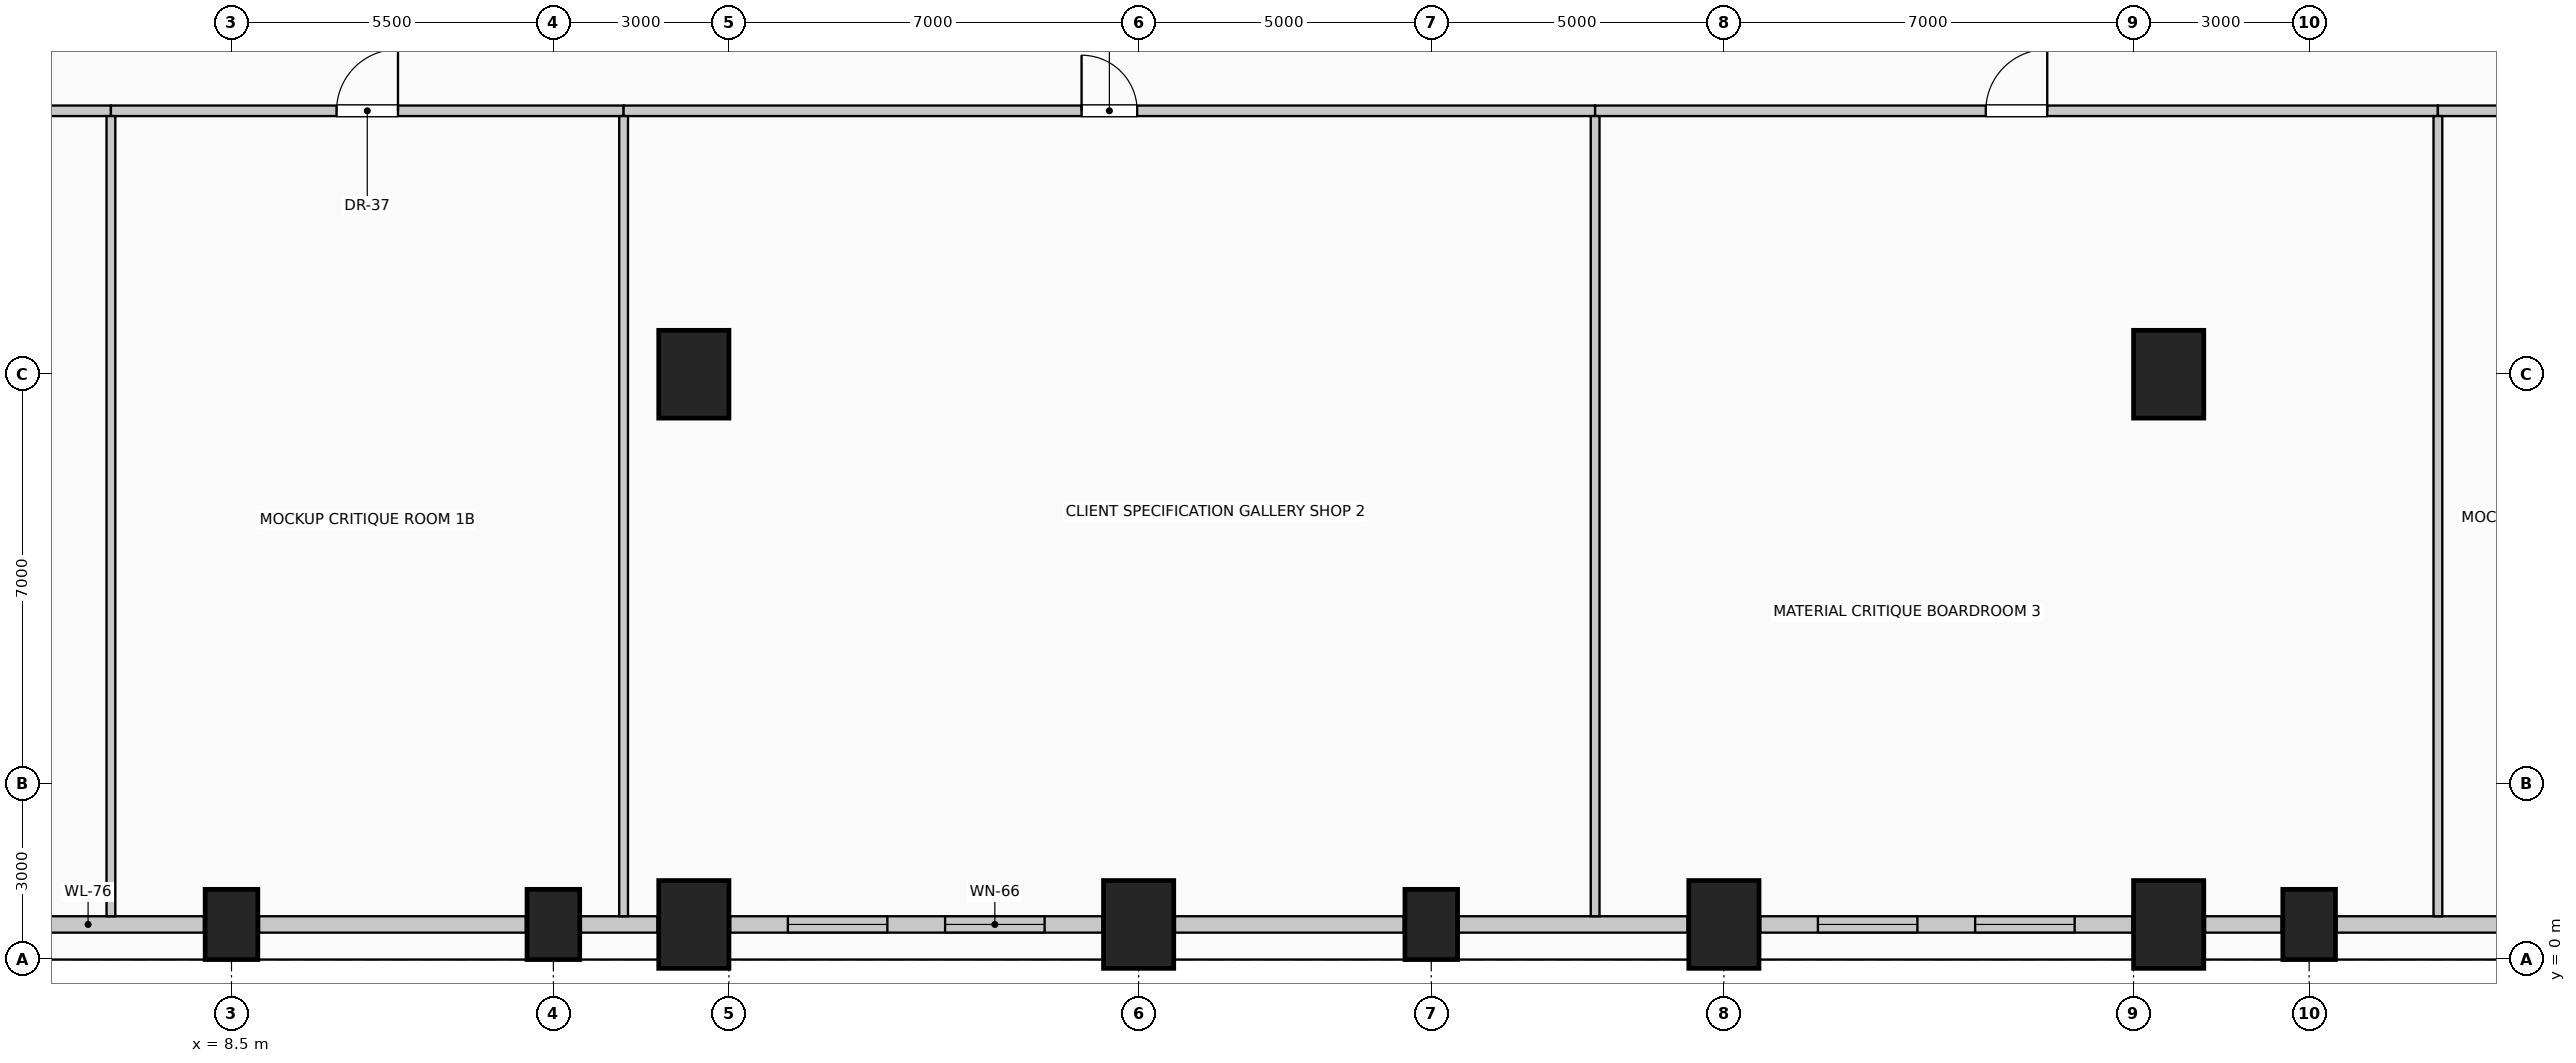
"""IFC4 building model, lengths in metres.
Left out: names, types, materials, properties, quantities, classifications, styles, units other than length and angle.
Written with IfcOpenShell. Run it as: python <this file> out.ifc"""

import sys

from ifc_helpers import new_model, si_unit, direction, frame, frame_2d, origin, origin_2d, place, context, subcontext, project, spatial, rectangle, extrude, element, fill, save


model = new_model("IFC4")
c1 = context("Model", 3, precision=1e-05, world=origin(), true_north=direction((0.0, 1.0)))
c2 = subcontext(c1, "Body", "Model", "MODEL_VIEW")
j1 = project(units=[si_unit("LENGTHUNIT", "METRE"), si_unit("PLANEANGLEUNIT", "RADIAN")], contexts=[c1])
p1 = place(None, origin())
s1 = spatial("IfcSite", under=j1, at=p1, CompositionType="ELEMENT")
p2 = place(p1, origin())
s2 = spatial("IfcBuilding", under=s1, at=p2, CompositionType="ELEMENT")
p3 = place(p2, frame((0.0, 0.0, 62.6)))
s3 = spatial("IfcBuildingStorey", under=s2, at=p3, CompositionType="ELEMENT", Elevation=62.6)
for number, where, z_axis, x_axis in (
    (1, (8.5, 0.6, 0.0), (0.0, 0.0, 1.0), (1.0, 0.0, 0.0)),
    (2, (14.0, 0.6, 0.0), (0.0, 0.0, 1.0), (1.0, 0.0, 0.0)),
):
    element("IfcColumn", number, at=place(p3, frame(where, z_axis=z_axis, x_axis=x_axis)), inside=s3, PredefinedType="COLUMN", context=c2, shape_type="SweptSolid", body=[
        extrude(rectangle(XDim=0.9, YDim=1.2, at=origin_2d()), origin(), (0.0, 0.0, 1.0), 4.0),
    ])
for number, where, z_axis, x_axis in (
    (3, (16.4, 0.6, 0.0), (0.0, 0.0, 1.0), (1.0, 0.0, 0.0)),
    (4, (24.0, 0.6, 0.0), (0.0, 0.0, 1.0), (1.0, 0.0, 0.0)),
):
    element("IfcColumn", number, at=place(p3, frame(where, z_axis=z_axis, x_axis=x_axis)), inside=s3, PredefinedType="COLUMN", context=c2, shape_type="SweptSolid", body=[
        extrude(rectangle(XDim=1.2, YDim=1.5, at=origin_2d()), origin(), (0.0, 0.0, 1.0), 4.0),
    ])
p4 = place(p3, frame((29.0, 0.6, 0.0), z_axis=(0.0, 0.0, 1.0), x_axis=(1.0, 0.0, 0.0)))
e5 = element("IfcColumn", 5, at=p4, inside=s3, PredefinedType="COLUMN", context=c2, shape_type="SweptSolid", body=[
    extrude(rectangle(XDim=0.9, YDim=1.2, at=origin_2d()), origin(), (0.0, 0.0, 1.0), 4.0),
])
for number, where, z_axis, x_axis in (
    (6, (34.0, 0.6, 0.0), (0.0, 0.0, 1.0), (1.0, 0.0, 0.0)),
    (7, (41.6, 0.6, 0.0), (0.0, 0.0, 1.0), (1.0, 0.0, 0.0)),
):
    element("IfcColumn", number, at=place(p3, frame(where, z_axis=z_axis, x_axis=x_axis)), inside=s3, PredefinedType="COLUMN", context=c2, shape_type="SweptSolid", body=[
        extrude(rectangle(XDim=1.2, YDim=1.5, at=origin_2d()), origin(), (0.0, 0.0, 1.0), 4.0),
    ])
p5 = place(p3, frame((44.0, 0.6, 0.0), z_axis=(0.0, 0.0, 1.0), x_axis=(1.0, 0.0, 0.0)))
e8 = element("IfcColumn", 8, at=p5, inside=s3, PredefinedType="COLUMN", context=c2, shape_type="SweptSolid", body=[
    extrude(rectangle(XDim=0.9, YDim=1.2, at=origin_2d()), origin(), (0.0, 0.0, 1.0), 4.0),
])
for number, where, z_axis, x_axis in (
    (9, (16.4, 10.0, 0.0), (0.0, 0.0, 1.0), (1.0, 0.0, 0.0)),
    (10, (41.6, 10.0, 0.0), (0.0, 0.0, 1.0), (1.0, 0.0, 0.0)),
):
    element("IfcColumn", number, at=place(p3, frame(where, z_axis=z_axis, x_axis=x_axis)), inside=s3, PredefinedType="COLUMN", context=c2, shape_type="SweptSolid", body=[
        extrude(rectangle(XDim=1.2, YDim=1.5, at=origin_2d()), origin(), (0.0, 0.0, 1.0), 4.0),
    ])
p6 = place(p3, frame((8.03, 0.6, 0.0), z_axis=(0.0, 0.0, 1.0), x_axis=(-1.0, 0.0, 0.0)))
e11 = element("IfcWall", 11, at=p6, inside=s3, PredefinedType="SOLIDWALL", context=c2, shape_type="SweptSolid", body=[
    extrude(rectangle(XDim=3.96, YDim=0.28, at=frame_2d((1.98, 0.0))), origin(), (0.0, 0.0, 1.0), 2.85),
])
p7 = place(p3, frame((13.53, 0.6, 0.0), z_axis=(0.0, 0.0, 1.0), x_axis=(-1.0, 0.0, 0.0)))
e12 = element("IfcWall", 12, at=p7, inside=s3, PredefinedType="SOLIDWALL", context=c2, shape_type="SweptSolid", body=[
    extrude(rectangle(XDim=4.56, YDim=0.28, at=frame_2d((2.28, 0.0))), origin(), (0.0, 0.0, 1.0), 2.85),
])
p8 = place(p3, frame((15.78, 0.6, 0.0), z_axis=(0.0, 0.0, 1.0), x_axis=(-1.0, 0.0, 0.0)))
e13 = element("IfcWall", 13, at=p8, inside=s3, PredefinedType="SOLIDWALL", context=c2, shape_type="SweptSolid", body=[
    extrude(rectangle(XDim=1.31, YDim=0.28, at=frame_2d((0.655, 0.0))), origin(), (0.0, 0.0, 1.0), 2.85),
])
p9 = place(p3, frame((23.38, 0.6, 0.0), z_axis=(0.0, 0.0, 1.0), x_axis=(-1.0, 0.0, 0.0)))
e14 = element("IfcWall", 14, at=p9, inside=s3, PredefinedType="SOLIDWALL", context=c2, shape_type="SweptSolid", body=[
    extrude(rectangle(XDim=6.36, YDim=0.28, at=frame_2d((3.18, 0.0))), origin(), (0.0, 0.0, 1.0), 2.85),
])
p10 = place(p9, frame((0.987, 0.0, 0.5)))
e15 = element("IfcOpeningElement", 15, at=p10, cuts=e14, PredefinedType="OPENING", context=c2, shape_type="SweptSolid", body=[
    extrude(rectangle(XDim=1.7, YDim=1.95, at=frame_2d((0.85, 0.975))), frame((0.0, 0.15, 0.0), z_axis=(0.0, -1.0, 0.0), x_axis=(1.0, 0.0, 0.0)), (0.0, 0.0, 1.0), 0.3),
])
p11 = place(p9, frame((3.673, 0.0, 0.5)))
e16 = element("IfcOpeningElement", 16, at=p11, cuts=e14, PredefinedType="OPENING", context=c2, shape_type="SweptSolid", body=[
    extrude(rectangle(XDim=1.7, YDim=1.95, at=frame_2d((0.85, 0.975))), frame((0.0, 0.15, 0.0), z_axis=(0.0, -1.0, 0.0), x_axis=(1.0, 0.0, 0.0)), (0.0, 0.0, 1.0), 0.3),
])
for number, where, z_axis, x_axis in (
    (17, (28.53, 0.6, 0.0), (0.0, 0.0, 1.0), (-1.0, 0.0, 0.0)),
    (18, (33.38, 0.6, 0.0), (0.0, 0.0, 1.0), (-1.0, 0.0, 0.0)),
):
    element("IfcWall", number, at=place(p3, frame(where, z_axis=z_axis, x_axis=x_axis)), inside=s3, PredefinedType="SOLIDWALL", context=c2, shape_type="SweptSolid", body=[
        extrude(rectangle(XDim=3.91, YDim=0.28, at=frame_2d((1.955, 0.0))), origin(), (0.0, 0.0, 1.0), 2.85),
    ])
p12 = place(p3, frame((40.98, 0.6, 0.0), z_axis=(0.0, 0.0, 1.0), x_axis=(-1.0, 0.0, 0.0)))
e19 = element("IfcWall", 19, at=p12, inside=s3, PredefinedType="SOLIDWALL", context=c2, shape_type="SweptSolid", body=[
    extrude(rectangle(XDim=6.36, YDim=0.28, at=frame_2d((3.18, 0.0))), origin(), (0.0, 0.0, 1.0), 2.85),
])
p13 = place(p12, frame((0.987, 0.0, 0.5)))
e20 = element("IfcOpeningElement", 20, at=p13, cuts=e19, PredefinedType="OPENING", context=c2, shape_type="SweptSolid", body=[
    extrude(rectangle(XDim=1.7, YDim=1.95, at=frame_2d((0.85, 0.975))), frame((0.0, 0.15, 0.0), z_axis=(0.0, -1.0, 0.0), x_axis=(1.0, 0.0, 0.0)), (0.0, 0.0, 1.0), 0.3),
])
p14 = place(p12, frame((3.673, 0.0, 0.5)))
e21 = element("IfcOpeningElement", 21, at=p14, cuts=e19, PredefinedType="OPENING", context=c2, shape_type="SweptSolid", body=[
    extrude(rectangle(XDim=1.7, YDim=1.95, at=frame_2d((0.85, 0.975))), frame((0.0, 0.15, 0.0), z_axis=(0.0, -1.0, 0.0), x_axis=(1.0, 0.0, 0.0)), (0.0, 0.0, 1.0), 0.3),
])
p15 = place(p3, frame((43.53, 0.6, 0.0), z_axis=(0.0, 0.0, 1.0), x_axis=(-1.0, 0.0, 0.0)))
e22 = element("IfcWall", 22, at=p15, inside=s3, PredefinedType="SOLIDWALL", context=c2, shape_type="SweptSolid", body=[
    extrude(rectangle(XDim=1.31, YDim=0.28, at=frame_2d((0.655, 0.0))), origin(), (0.0, 0.0, 1.0), 2.85),
])
p16 = place(p3, frame((49.03, 0.6, 0.0), z_axis=(0.0, 0.0, 1.0), x_axis=(-1.0, 0.0, 0.0)))
e23 = element("IfcWall", 23, at=p16, inside=s3, PredefinedType="SOLIDWALL", context=c2, shape_type="SweptSolid", body=[
    extrude(rectangle(XDim=4.56, YDim=0.28, at=frame_2d((2.28, 0.0))), origin(), (0.0, 0.0, 1.0), 2.85),
])
p17 = place(p3, frame((0.74, 14.5, 0.0), z_axis=(0.0, 0.0, 1.0), x_axis=(1.0, 0.0, 0.0)))
e24 = element("IfcWall", 24, at=p17, inside=s3, PredefinedType="PARTITIONING", context=c2, shape_type="SweptSolid", body=[
    extrude(rectangle(XDim=5.7, YDim=0.18, at=frame_2d((2.85, 0.0))), origin(), (0.0, 0.0, 1.0), 3.7),
])
p18 = place(p17, frame((2.375, 0.0, 0.0)))
e25 = element("IfcOpeningElement", 25, at=p18, cuts=e24, PredefinedType="OPENING", context=c2, shape_type="SweptSolid", body=[
    extrude(rectangle(XDim=0.95, YDim=2.15, at=frame_2d((0.475, 1.075))), frame((0.0, 0.1, 0.0), z_axis=(0.0, -1.0, 0.0), x_axis=(1.0, 0.0, 0.0)), (0.0, 0.0, 1.0), 0.2),
])
p19 = place(p3, frame((6.44, 14.5, 0.0), z_axis=(0.0, 0.0, 1.0), x_axis=(1.0, 0.0, 0.0)))
e26 = element("IfcWall", 26, at=p19, inside=s3, PredefinedType="PARTITIONING", context=c2, shape_type="SweptSolid", body=[
    extrude(rectangle(XDim=8.76, YDim=0.18, at=frame_2d((4.38, 0.0))), origin(), (0.0, 0.0, 1.0), 3.7),
])
p20 = place(p19, frame((3.855, 0.0, 0.0)))
e27 = element("IfcOpeningElement", 27, at=p20, cuts=e26, PredefinedType="OPENING", context=c2, shape_type="SweptSolid", body=[
    extrude(rectangle(XDim=1.05, YDim=2.15, at=frame_2d((0.525, 1.075))), frame((0.0, 0.1, 0.0), z_axis=(0.0, -1.0, 0.0), x_axis=(1.0, 0.0, 0.0)), (0.0, 0.0, 1.0), 0.2),
])
p21 = place(p3, frame((15.2, 14.5, 0.0), z_axis=(0.0, 0.0, 1.0), x_axis=(1.0, 0.0, 0.0)))
e28 = element("IfcWall", 28, at=p21, inside=s3, PredefinedType="PARTITIONING", context=c2, shape_type="SweptSolid", body=[
    extrude(rectangle(XDim=16.6, YDim=0.18, at=frame_2d((8.3, 0.0))), origin(), (0.0, 0.0, 1.0), 3.7),
])
p22 = place(p21, frame((7.825, 0.0, 0.0)))
e29 = element("IfcOpeningElement", 29, at=p22, cuts=e28, PredefinedType="OPENING", context=c2, shape_type="SweptSolid", body=[
    extrude(rectangle(XDim=0.95, YDim=2.15, at=frame_2d((0.475, 1.075))), frame((0.0, 0.1, 0.0), z_axis=(0.0, -1.0, 0.0), x_axis=(1.0, 0.0, 0.0)), (0.0, 0.0, 1.0), 0.2),
])
p23 = place(p3, frame((31.8, 14.5, 0.0), z_axis=(0.0, 0.0, 1.0), x_axis=(1.0, 0.0, 0.0)))
e30 = element("IfcWall", 30, at=p23, inside=s3, PredefinedType="PARTITIONING", context=c2, shape_type="SweptSolid", body=[
    extrude(rectangle(XDim=14.4, YDim=0.18, at=frame_2d((7.2, 0.0))), origin(), (0.0, 0.0, 1.0), 3.7),
])
p24 = place(p23, frame((6.675, 0.0, 0.0)))
e31 = element("IfcOpeningElement", 31, at=p24, cuts=e30, PredefinedType="OPENING", context=c2, shape_type="SweptSolid", body=[
    extrude(rectangle(XDim=1.05, YDim=2.15, at=frame_2d((0.525, 1.075))), frame((0.0, 0.1, 0.0), z_axis=(0.0, -1.0, 0.0), x_axis=(1.0, 0.0, 0.0)), (0.0, 0.0, 1.0), 0.2),
])
p25 = place(p3, frame((46.2, 14.5, 0.0), z_axis=(0.0, 0.0, 1.0), x_axis=(1.0, 0.0, 0.0)))
e32 = element("IfcWall", 32, at=p25, inside=s3, PredefinedType="PARTITIONING", context=c2, shape_type="SweptSolid", body=[
    extrude(rectangle(XDim=4.48, YDim=0.18, at=frame_2d((2.24, 0.0))), origin(), (0.0, 0.0, 1.0), 3.7),
])
p26 = place(p25, frame((1.765, 0.0, 0.0)))
e33 = element("IfcOpeningElement", 33, at=p26, cuts=e32, PredefinedType="OPENING", context=c2, shape_type="SweptSolid", body=[
    extrude(rectangle(XDim=0.95, YDim=2.15, at=frame_2d((0.475, 1.075))), frame((0.0, 0.1, 0.0), z_axis=(0.0, -1.0, 0.0), x_axis=(1.0, 0.0, 0.0)), (0.0, 0.0, 1.0), 0.2),
])
for number, where, z_axis, x_axis in (
    (34, (6.44, 0.74, 0.0), (0.0, 0.0, 1.0), (0.0, 1.0, 0.0)),
    (35, (15.2, 0.74, 0.0), (0.0, 0.0, 1.0), (0.0, 1.0, 0.0)),
    (36, (31.8, 0.74, 0.0), (0.0, 0.0, 1.0), (0.0, 1.0, 0.0)),
    (37, (46.2, 0.74, 0.0), (0.0, 0.0, 1.0), (0.0, 1.0, 0.0)),
):
    element("IfcWall", number, at=place(p3, frame(where, z_axis=z_axis, x_axis=x_axis)), inside=s3, PredefinedType="PARTITIONING", context=c2, shape_type="SweptSolid", body=[
        extrude(rectangle(XDim=13.67, YDim=0.15, at=frame_2d((6.835, 0.0))), origin(), (0.0, 0.0, 1.0), 3.7),
    ])
p27 = place(p10, origin())
e38 = element("IfcWindow", 38, at=p27, inside=s3, PartitioningType="SINGLE_PANEL", PredefinedType="WINDOW", context=c2, shape_type="SweptSolid", body=[
    extrude(rectangle(XDim=1.7, YDim=1.95, at=frame_2d((0.85, 0.975))), frame((0.0, 0.03, 0.0), z_axis=(0.0, -1.0, 0.0), x_axis=(1.0, 0.0, 0.0)), (0.0, 0.0, 1.0), 0.06),
])
fill(e15, e38)
p28 = place(p11, origin())
e39 = element("IfcWindow", 39, at=p28, inside=s3, PartitioningType="SINGLE_PANEL", PredefinedType="WINDOW", context=c2, shape_type="SweptSolid", body=[
    extrude(rectangle(XDim=1.7, YDim=1.95, at=frame_2d((0.85, 0.975))), frame((0.0, 0.03, 0.0), z_axis=(0.0, -1.0, 0.0), x_axis=(1.0, 0.0, 0.0)), (0.0, 0.0, 1.0), 0.06),
])
fill(e16, e39)
p29 = place(p13, origin())
e40 = element("IfcWindow", 40, at=p29, inside=s3, PartitioningType="SINGLE_PANEL", PredefinedType="WINDOW", context=c2, shape_type="SweptSolid", body=[
    extrude(rectangle(XDim=1.7, YDim=1.95, at=frame_2d((0.85, 0.975))), frame((0.0, 0.03, 0.0), z_axis=(0.0, -1.0, 0.0), x_axis=(1.0, 0.0, 0.0)), (0.0, 0.0, 1.0), 0.06),
])
fill(e20, e40)
p30 = place(p14, origin())
e41 = element("IfcWindow", 41, at=p30, inside=s3, PartitioningType="SINGLE_PANEL", PredefinedType="WINDOW", context=c2, shape_type="SweptSolid", body=[
    extrude(rectangle(XDim=1.7, YDim=1.95, at=frame_2d((0.85, 0.975))), frame((0.0, 0.03, 0.0), z_axis=(0.0, -1.0, 0.0), x_axis=(1.0, 0.0, 0.0)), (0.0, 0.0, 1.0), 0.06),
])
fill(e21, e41)
p31 = place(p20, origin())
e42 = element("IfcDoor", 42, at=p31, inside=s3, OperationType="SINGLE_SWING_RIGHT", PredefinedType="DOOR", context=c2, shape_type="SweptSolid", body=[
    extrude(rectangle(XDim=1.05, YDim=2.15, at=frame_2d((0.525, 1.075))), frame((0.0, 0.025, 0.0), z_axis=(0.0, -1.0, 0.0), x_axis=(1.0, 0.0, 0.0)), (0.0, 0.0, 1.0), 0.05),
])
fill(e27, e42)
p32 = place(p22, origin())
e43 = element("IfcDoor", 43, at=p32, inside=s3, OperationType="SINGLE_SWING_LEFT", PredefinedType="DOOR", context=c2, shape_type="SweptSolid", body=[
    extrude(rectangle(XDim=0.95, YDim=2.15, at=frame_2d((0.475, 1.075))), frame((0.0, 0.025, 0.0), z_axis=(0.0, -1.0, 0.0), x_axis=(1.0, 0.0, 0.0)), (0.0, 0.0, 1.0), 0.05),
])
fill(e29, e43)
p33 = place(p24, origin())
e44 = element("IfcDoor", 44, at=p33, inside=s3, OperationType="SINGLE_SWING_RIGHT", PredefinedType="DOOR", context=c2, shape_type="SweptSolid", body=[
    extrude(rectangle(XDim=1.05, YDim=2.15, at=frame_2d((0.525, 1.075))), frame((0.0, 0.025, 0.0), z_axis=(0.0, -1.0, 0.0), x_axis=(1.0, 0.0, 0.0)), (0.0, 0.0, 1.0), 0.05),
])
fill(e31, e44)
save(model, sys.argv[1])
